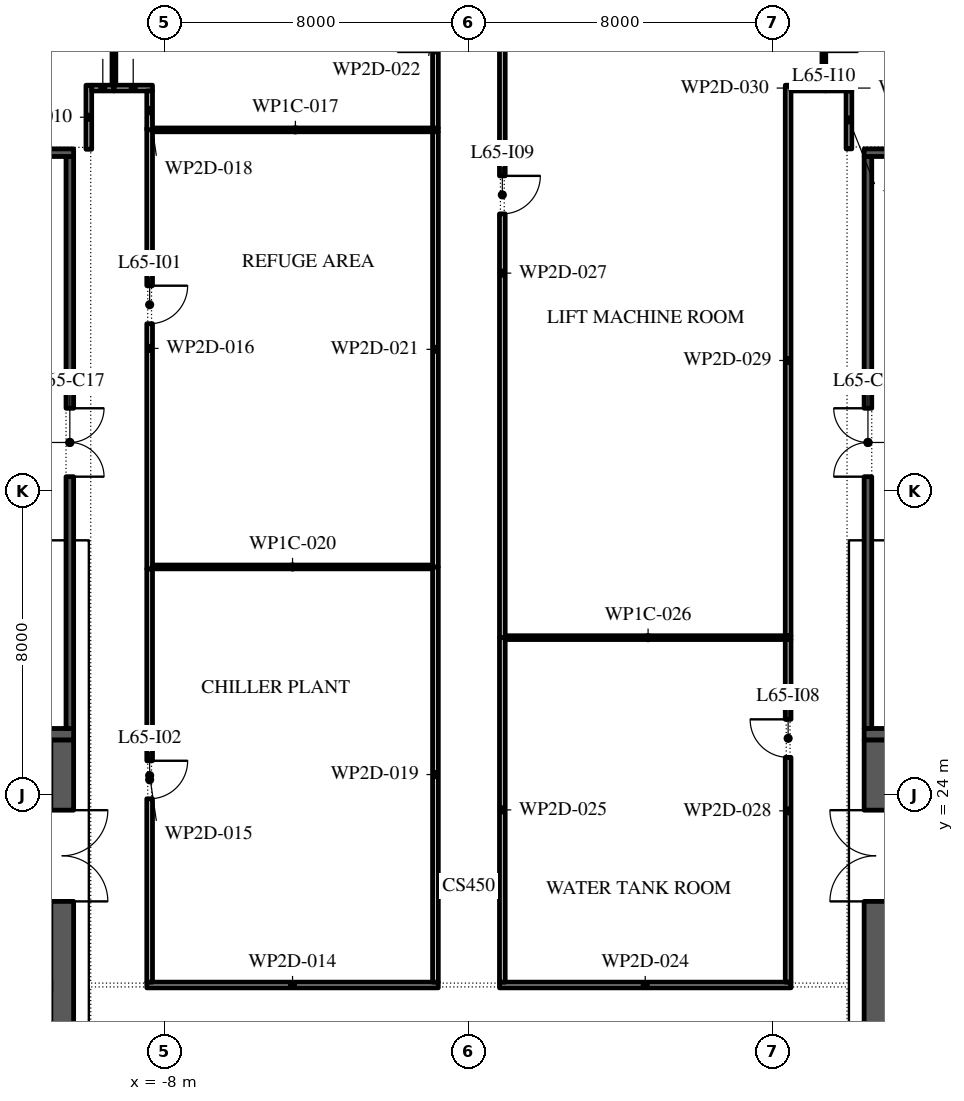
"""IFC4 building model, lengths in metres.
Left out: names, types, materials, properties, quantities, classifications, styles, units other than length and angle.
Written with IfcOpenShell. Run it as: python <this file> out.ifc"""

import sys

from ifc_helpers import new_model, si_unit, direction, frame, frame_2d, origin, place, context, subcontext, project, spatial, rectangle, extrude, element, fill, save


model = new_model("IFC4")
c1 = context("Model", 3, precision=1e-05, world=origin(), true_north=direction((0.0, 1.0)))
c2 = subcontext(c1, "Body", "Model", "MODEL_VIEW")
j1 = project(units=[si_unit("LENGTHUNIT", "METRE"), si_unit("PLANEANGLEUNIT", "RADIAN")], contexts=[c1])
p1 = place(None, origin())
s1 = spatial("IfcSite", under=j1, at=p1, CompositionType="ELEMENT")
p2 = place(p1, origin())
s2 = spatial("IfcBuilding", under=s1, at=p2, CompositionType="ELEMENT")
p3 = place(p2, frame((0.0, 0.0, 297.6)))
s3 = spatial("IfcBuildingStorey", under=s2, at=p3, CompositionType="ELEMENT", Elevation=297.6)
p4 = place(p3, frame((29.616, 40.758, 0.0), z_axis=(0.0, 0.0, 1.0), x_axis=(-0.974370532314, 0.224949029246, 0.0)))
e1 = element("IfcWall", 1, at=p4, inside=s3, PredefinedType="STANDARD", context=c2, shape_type="SweptSolid", body=[
    extrude(rectangle(XDim=48.0, YDim=0.3, at=frame_2d((24.0, 0.0))), origin(), (0.0, 0.0, 1.0), 4.95),
])
p5 = place(p4, frame((2.075, 0.0, 0.6)))
e2 = element("IfcOpeningElement", 2, at=p5, cuts=e1, PredefinedType="OPENING", context=c2, shape_type="SweptSolid", body=[
    extrude(rectangle(XDim=3.6, YDim=3.9, at=frame_2d((1.8, 1.95))), frame((0.0, 0.16, 0.0), z_axis=(0.0, -1.0, 0.0), x_axis=(1.0, 0.0, 0.0)), (0.0, 0.0, 1.0), 0.32),
])
p6 = place(p4, frame((9.975, 0.0, 0.6)))
e3 = element("IfcOpeningElement", 3, at=p6, cuts=e1, PredefinedType="OPENING", context=c2, shape_type="SweptSolid", body=[
    extrude(rectangle(XDim=3.6, YDim=3.55, at=frame_2d((1.8, 1.775))), frame((0.0, 0.16, 0.0), z_axis=(0.0, -1.0, 0.0), x_axis=(1.0, 0.0, 0.0)), (0.0, 0.0, 1.0), 0.32),
])
p7 = place(p4, frame((18.025, 0.0, 0.6)))
e4 = element("IfcOpeningElement", 4, at=p7, cuts=e1, PredefinedType="OPENING", context=c2, shape_type="SweptSolid", body=[
    extrude(rectangle(XDim=3.6, YDim=3.55, at=frame_2d((1.8, 1.775))), frame((0.0, 0.16, 0.0), z_axis=(0.0, -1.0, 0.0), x_axis=(1.0, 0.0, 0.0)), (0.0, 0.0, 1.0), 0.32),
])
p8 = place(p4, frame((26.075, 0.0, 0.6)))
e5 = element("IfcOpeningElement", 5, at=p8, cuts=e1, PredefinedType="OPENING", context=c2, shape_type="SweptSolid", body=[
    extrude(rectangle(XDim=3.6, YDim=3.9, at=frame_2d((1.8, 1.95))), frame((0.0, 0.16, 0.0), z_axis=(0.0, -1.0, 0.0), x_axis=(1.0, 0.0, 0.0)), (0.0, 0.0, 1.0), 0.32),
])
p9 = place(p4, frame((34.125, 0.0, 0.6)))
e6 = element("IfcOpeningElement", 6, at=p9, cuts=e1, PredefinedType="OPENING", context=c2, shape_type="SweptSolid", body=[
    extrude(rectangle(XDim=3.6, YDim=3.55, at=frame_2d((1.8, 1.775))), frame((0.0, 0.16, 0.0), z_axis=(0.0, -1.0, 0.0), x_axis=(1.0, 0.0, 0.0)), (0.0, 0.0, 1.0), 0.32),
])
p10 = place(p4, frame((42.175, 0.0, 0.6)))
e7 = element("IfcOpeningElement", 7, at=p10, cuts=e1, PredefinedType="OPENING", context=c2, shape_type="SweptSolid", body=[
    extrude(rectangle(XDim=3.6, YDim=3.9, at=frame_2d((1.8, 1.95))), frame((0.0, 0.16, 0.0), z_axis=(0.0, -1.0, 0.0), x_axis=(1.0, 0.0, 0.0)), (0.0, 0.0, 1.0), 0.32),
])
p11 = place(p3, frame((-10.7, -2.45, 0.0), z_axis=(0.0, 0.0, 1.0), x_axis=(0.0, 1.0, 0.0)))
e8 = element("IfcWall", 8, at=p11, inside=s3, PredefinedType="SHEAR", context=c2, shape_type="SweptSolid", body=[
    extrude(rectangle(XDim=27.9, YDim=0.6, at=frame_2d((13.95, 0.0))), origin(), (0.0, 0.0, 1.0), 4.95),
])
p12 = place(p11, frame((23.65, 0.0, 0.0)))
e9 = element("IfcOpeningElement", 9, at=p12, cuts=e8, PredefinedType="OPENING", context=c2, shape_type="SweptSolid", body=[
    extrude(rectangle(XDim=2.4, YDim=2.1, at=frame_2d((1.2, 1.05))), frame((0.0, 0.31, 0.0), z_axis=(0.0, -1.0, 0.0), x_axis=(1.0, 0.0, 0.0)), (0.0, 0.0, 1.0), 0.62),
])
p13 = place(p11, frame((0.938, 0.0, 0.0)))
e10 = element("IfcOpeningElement", 10, at=p13, cuts=e8, PredefinedType="OPENING", context=c2, shape_type="SweptSolid", body=[
    extrude(rectangle(XDim=1.8, YDim=2.4, at=frame_2d((0.9, 1.2))), frame((0.0, 0.31, 0.0), z_axis=(0.0, -1.0, 0.0), x_axis=(1.0, 0.0, 0.0)), (0.0, 0.0, 1.0), 0.62),
])
p14 = place(p11, frame((4.163, 0.0, 0.0)))
e11 = element("IfcOpeningElement", 11, at=p14, cuts=e8, PredefinedType="OPENING", context=c2, shape_type="SweptSolid", body=[
    extrude(rectangle(XDim=1.8, YDim=2.4, at=frame_2d((0.9, 1.2))), frame((0.0, 0.31, 0.0), z_axis=(0.0, -1.0, 0.0), x_axis=(1.0, 0.0, 0.0)), (0.0, 0.0, 1.0), 0.62),
])
p15 = place(p3, frame((-21.6, 25.6, 0.0), z_axis=(0.0, 0.0, 1.0), x_axis=(1.0, 0.0, 0.0)))
e12 = element("IfcWall", 12, at=p15, inside=s3, PredefinedType="SHEAR", context=c2, shape_type="SweptSolid", body=[
    extrude(rectangle(XDim=11.2, YDim=0.3, at=frame_2d((5.6, 0.0))), origin(), (0.0, 0.0, 1.0), 4.95),
])
p16 = place(p3, frame((-10.5, 25.75, 0.0), z_axis=(0.0, 0.0, 1.0), x_axis=(0.0, 1.0, 0.0)))
e13 = element("IfcWall", 13, at=p16, inside=s3, PredefinedType="SHEAR", context=c2, shape_type="SweptSolid", body=[
    extrude(rectangle(XDim=15.05, YDim=0.2, at=frame_2d((7.525, 0.0))), origin(), (0.0, 0.0, 1.0), 4.95),
])
p17 = place(p16, frame((6.625, 0.0, 0.0)))
e14 = element("IfcOpeningElement", 14, at=p17, cuts=e13, PredefinedType="OPENING", context=c2, shape_type="SweptSolid", body=[
    extrude(rectangle(XDim=1.8, YDim=2.4, at=frame_2d((0.9, 1.2))), frame((0.0, 0.11, 0.0), z_axis=(0.0, -1.0, 0.0), x_axis=(1.0, 0.0, 0.0)), (0.0, 0.0, 1.0), 0.22),
])
p18 = place(p3, frame((-21.6, 40.9, 0.0), z_axis=(0.0, 0.0, 1.0), x_axis=(1.0, 0.0, 0.0)))
e15 = element("IfcWall", 15, at=p18, inside=s3, PredefinedType="SHEAR", context=c2, shape_type="SweptSolid", body=[
    extrude(rectangle(XDim=11.2, YDim=0.2, at=frame_2d((5.6, 0.0))), origin(), (0.0, 0.0, 1.0), 4.95),
])
p19 = place(p3, frame((10.7, -2.45, 0.0), z_axis=(0.0, 0.0, 1.0), x_axis=(0.0, 1.0, 0.0)))
e16 = element("IfcWall", 16, at=p19, inside=s3, PredefinedType="SHEAR", context=c2, shape_type="SweptSolid", body=[
    extrude(rectangle(XDim=27.9, YDim=0.6, at=frame_2d((13.95, 0.0))), origin(), (0.0, 0.0, 1.0), 4.95),
])
p20 = place(p19, frame((23.65, 0.0, 0.0)))
e17 = element("IfcOpeningElement", 17, at=p20, cuts=e16, PredefinedType="OPENING", context=c2, shape_type="SweptSolid", body=[
    extrude(rectangle(XDim=2.4, YDim=2.1, at=frame_2d((1.2, 1.05))), frame((0.0, 0.31, 0.0), z_axis=(0.0, -1.0, 0.0), x_axis=(1.0, 0.0, 0.0)), (0.0, 0.0, 1.0), 0.62),
])
p21 = place(p19, frame((0.337, 0.0, 0.0)))
e18 = element("IfcOpeningElement", 18, at=p21, cuts=e16, PredefinedType="OPENING", context=c2, shape_type="SweptSolid", body=[
    extrude(rectangle(XDim=1.8, YDim=2.4, at=frame_2d((0.9, 1.2))), frame((0.0, 0.31, 0.0), z_axis=(0.0, -1.0, 0.0), x_axis=(1.0, 0.0, 0.0)), (0.0, 0.0, 1.0), 0.62),
])
p22 = place(p19, frame((3.562, 0.0, 0.0)))
e19 = element("IfcOpeningElement", 19, at=p22, cuts=e16, PredefinedType="OPENING", context=c2, shape_type="SweptSolid", body=[
    extrude(rectangle(XDim=1.8, YDim=2.4, at=frame_2d((0.9, 1.2))), frame((0.0, 0.31, 0.0), z_axis=(0.0, -1.0, 0.0), x_axis=(1.0, 0.0, 0.0)), (0.0, 0.0, 1.0), 0.62),
])
p23 = place(p3, frame((10.4, 25.6, 0.0), z_axis=(0.0, 0.0, 1.0), x_axis=(1.0, 0.0, 0.0)))
e20 = element("IfcWall", 20, at=p23, inside=s3, PredefinedType="SHEAR", context=c2, shape_type="SweptSolid", body=[
    extrude(rectangle(XDim=11.2, YDim=0.3, at=frame_2d((5.6, 0.0))), origin(), (0.0, 0.0, 1.0), 4.95),
])
p24 = place(p3, frame((10.5, 25.75, 0.0), z_axis=(0.0, 0.0, 1.0), x_axis=(0.0, 1.0, 0.0)))
e21 = element("IfcWall", 21, at=p24, inside=s3, PredefinedType="SHEAR", context=c2, shape_type="SweptSolid", body=[
    extrude(rectangle(XDim=15.05, YDim=0.2, at=frame_2d((7.525, 0.0))), origin(), (0.0, 0.0, 1.0), 4.95),
])
p25 = place(p24, frame((6.625, 0.0, 0.0)))
e22 = element("IfcOpeningElement", 22, at=p25, cuts=e21, PredefinedType="OPENING", context=c2, shape_type="SweptSolid", body=[
    extrude(rectangle(XDim=1.8, YDim=2.4, at=frame_2d((0.9, 1.2))), frame((0.0, 0.11, 0.0), z_axis=(0.0, -1.0, 0.0), x_axis=(1.0, 0.0, 0.0)), (0.0, 0.0, 1.0), 0.22),
])
p26 = place(p3, frame((10.4, 40.9, 0.0), z_axis=(0.0, 0.0, 1.0), x_axis=(1.0, 0.0, 0.0)))
e23 = element("IfcWall", 23, at=p26, inside=s3, PredefinedType="SHEAR", context=c2, shape_type="SweptSolid", body=[
    extrude(rectangle(XDim=11.2, YDim=0.2, at=frame_2d((5.6, 0.0))), origin(), (0.0, 0.0, 1.0), 4.95),
])
p27 = place(p3, frame((-10.0, 40.99, 0.0), z_axis=(0.0, 0.0, 1.0), x_axis=(0.0, 1.0, 0.0)))
e24 = element("IfcWall", 24, at=p27, inside=s3, PredefinedType="PARTITIONING", context=c2, shape_type="SweptSolid", body=[
    extrude(rectangle(XDim=1.685, YDim=0.15, at=frame_2d((0.843, 0.0))), origin(), (0.0, 0.0, 1.0), 4.95),
])
p28 = place(p3, frame((-9.925, 42.6, 0.0), z_axis=(0.0, 0.0, 1.0), x_axis=(1.0, 0.0, 0.0)))
e25 = element("IfcWall", 25, at=p28, inside=s3, PredefinedType="PARTITIONING", context=c2, shape_type="SweptSolid", body=[
    extrude(rectangle(XDim=0.585, YDim=0.15, at=frame_2d((0.292, 0.0))), origin(), (0.0, 0.0, 1.0), 4.95),
])
p29 = place(p3, frame((-9.34, 42.675, 0.0), z_axis=(0.0, 0.0, 1.0), x_axis=(0.0, 1.0, 0.0)))
e26 = element("IfcWall", 26, at=p29, inside=s3, PredefinedType="PARTITIONING", context=c2, shape_type="SweptSolid", body=[
    extrude(rectangle(XDim=7.006, YDim=0.1, at=frame_2d((3.503, 0.0))), origin(), (0.0, 0.0, 1.0), 4.95),
])
p30 = place(p29, frame((2.375, 0.0, 0.0)))
e27 = element("IfcOpeningElement", 27, at=p30, cuts=e26, PredefinedType="OPENING", context=c2, shape_type="SweptSolid", body=[
    extrude(rectangle(XDim=0.9, YDim=2.1, at=frame_2d((0.45, 1.05))), frame((0.0, 0.06, 0.0), z_axis=(0.0, -1.0, 0.0), x_axis=(1.0, 0.0, 0.0)), (0.0, 0.0, 1.0), 0.12),
])
p31 = place(p3, frame((-9.34, 42.6, 0.0), z_axis=(0.0, 0.0, 1.0), x_axis=(1.0, 0.0, 0.0)))
e28 = element("IfcWall", 28, at=p31, inside=s3, PredefinedType="PARTITIONING", context=c2, shape_type="SweptSolid", body=[
    extrude(rectangle(XDim=1.015, YDim=0.15, at=frame_2d((0.508, 0.0))), origin(), (0.0, 0.0, 1.0), 4.95),
])
p32 = place(p3, frame((-8.475, 19.0, 0.0), z_axis=(0.0, 0.0, 1.0), x_axis=(1.0, 0.0, 0.0)))
e29 = element("IfcWall", 29, at=p32, inside=s3, PredefinedType="PARTITIONING", context=c2, shape_type="SweptSolid", body=[
    extrude(rectangle(XDim=7.67, YDim=0.15, at=frame_2d((3.835, 0.0))), origin(), (0.0, 0.0, 1.0), 4.95),
])
p33 = place(p3, frame((-8.4, 29.95, 0.0), z_axis=(0.0, 0.0, 1.0), x_axis=(0.0, -1.0, 0.0)))
e30 = element("IfcWall", 30, at=p33, inside=s3, PredefinedType="PARTITIONING", context=c2, shape_type="SweptSolid", body=[
    extrude(rectangle(XDim=10.875, YDim=0.15, at=frame_2d((5.438, 0.0))), origin(), (0.0, 0.0, 1.0), 4.95),
])
p34 = place(p33, frame((5.05, 0.0, 0.0)))
e31 = element("IfcOpeningElement", 31, at=p34, cuts=e30, PredefinedType="OPENING", context=c2, shape_type="SweptSolid", body=[
    extrude(rectangle(XDim=1.0, YDim=2.1, at=frame_2d((0.5, 1.05))), frame((0.0, 0.085, 0.0), z_axis=(0.0, -1.0, 0.0), x_axis=(1.0, 0.0, 0.0)), (0.0, 0.0, 1.0), 0.17),
])
p35 = place(p3, frame((-8.4, 41.55, 0.0), z_axis=(0.0, 0.0, 1.0), x_axis=(0.0, -1.0, 0.0)))
e32 = element("IfcWall", 32, at=p35, inside=s3, PredefinedType="PARTITIONING", context=c2, shape_type="SweptSolid", body=[
    extrude(rectangle(XDim=11.6, YDim=0.15, at=frame_2d((5.8, 0.0))), origin(), (0.0, 0.0, 1.0), 4.95),
])
p36 = place(p35, frame((4.15, 0.0, 0.0)))
e33 = element("IfcOpeningElement", 33, at=p36, cuts=e32, PredefinedType="OPENING", context=c2, shape_type="SweptSolid", body=[
    extrude(rectangle(XDim=1.0, YDim=2.1, at=frame_2d((0.5, 1.05))), frame((0.0, 0.085, 0.0), z_axis=(0.0, -1.0, 0.0), x_axis=(1.0, 0.0, 0.0)), (0.0, 0.0, 1.0), 0.17),
])
p37 = place(p3, frame((-8.325, 41.5, 0.0), z_axis=(0.0, 0.0, 1.0), x_axis=(1.0, 0.0, 0.0)))
e34 = element("IfcWall", 34, at=p37, inside=s3, PredefinedType="PARTITIONING", context=c2, shape_type="SweptSolid", body=[
    extrude(rectangle(XDim=7.52, YDim=0.1, at=frame_2d((3.76, 0.0))), origin(), (0.0, 0.0, 1.0), 4.95),
])
p38 = place(p3, frame((-8.4, 42.525, 0.0), z_axis=(0.0, 0.0, 1.0), x_axis=(0.0, -1.0, 0.0)))
e35 = element("IfcWall", 35, at=p38, inside=s3, PredefinedType="PARTITIONING", context=c2, shape_type="SweptSolid", body=[
    extrude(rectangle(XDim=1.025, YDim=0.15, at=frame_2d((0.512, 0.0))), origin(), (0.0, 0.0, 1.0), 4.95),
])
p39 = place(p3, frame((-0.88, 19.075, 0.0), z_axis=(0.0, 0.0, 1.0), x_axis=(0.0, 1.0, 0.0)))
e36 = element("IfcWall", 36, at=p39, inside=s3, PredefinedType="PARTITIONING", context=c2, shape_type="SweptSolid", body=[
    extrude(rectangle(XDim=10.925, YDim=0.15, at=frame_2d((5.462, 0.0))), origin(), (0.0, 0.0, 1.0), 4.95),
])
p40 = place(p3, frame((-0.955, 30.0, 0.0), z_axis=(0.0, 0.0, 1.0), x_axis=(-1.0, 0.0, 0.0)))
e37 = element("IfcWall", 37, at=p40, inside=s3, PredefinedType="PARTITIONING", context=c2, shape_type="SweptSolid", body=[
    extrude(rectangle(XDim=7.37, YDim=0.1, at=frame_2d((3.685, 0.0))), origin(), (0.0, 0.0, 1.0), 4.95),
])
p41 = place(p3, frame((-0.88, 30.0, 0.0), z_axis=(0.0, 0.0, 1.0), x_axis=(0.0, 1.0, 0.0)))
e38 = element("IfcWall", 38, at=p41, inside=s3, PredefinedType="PARTITIONING", context=c2, shape_type="SweptSolid", body=[
    extrude(rectangle(XDim=11.45, YDim=0.15, at=frame_2d((5.725, 0.0))), origin(), (0.0, 0.0, 1.0), 4.95),
])
p42 = place(p3, frame((-0.88, 41.55, 0.0), z_axis=(0.0, 0.0, 1.0), x_axis=(0.0, 1.0, 0.0)))
e39 = element("IfcWall", 39, at=p42, inside=s3, PredefinedType="PARTITIONING", context=c2, shape_type="SweptSolid", body=[
    extrude(rectangle(XDim=6.178, YDim=0.15, at=frame_2d((3.089, 0.0))), origin(), (0.0, 0.0, 1.0), 4.95),
])
p43 = place(p42, frame((2.0, 0.0, 0.0)))
e40 = element("IfcOpeningElement", 40, at=p43, cuts=e39, PredefinedType="OPENING", context=c2, shape_type="SweptSolid", body=[
    extrude(rectangle(XDim=1.0, YDim=2.1, at=frame_2d((0.5, 1.05))), frame((0.0, 0.085, 0.0), z_axis=(0.0, -1.0, 0.0), x_axis=(1.0, 0.0, 0.0)), (0.0, 0.0, 1.0), 0.17),
])
p44 = place(p3, frame((0.805, 19.0, 0.0), z_axis=(0.0, 0.0, 1.0), x_axis=(1.0, 0.0, 0.0)))
e41 = element("IfcWall", 41, at=p44, inside=s3, PredefinedType="PARTITIONING", context=c2, shape_type="SweptSolid", body=[
    extrude(rectangle(XDim=7.67, YDim=0.15, at=frame_2d((3.835, 0.0))), origin(), (0.0, 0.0, 1.0), 4.95),
])
p45 = place(p3, frame((0.88, 28.14, 0.0), z_axis=(0.0, 0.0, 1.0), x_axis=(0.0, -1.0, 0.0)))
e42 = element("IfcWall", 42, at=p45, inside=s3, PredefinedType="PARTITIONING", context=c2, shape_type="SweptSolid", body=[
    extrude(rectangle(XDim=9.065, YDim=0.15, at=frame_2d((4.532, 0.0))), origin(), (0.0, 0.0, 1.0), 4.95),
])
p46 = place(p3, frame((0.955, 28.14, 0.0), z_axis=(0.0, 0.0, 1.0), x_axis=(1.0, 0.0, 0.0)))
e43 = element("IfcWall", 43, at=p46, inside=s3, PredefinedType="PARTITIONING", context=c2, shape_type="SweptSolid", body=[
    extrude(rectangle(XDim=7.52, YDim=0.1, at=frame_2d((3.76, 0.0))), origin(), (0.0, 0.0, 1.0), 4.95),
])
p47 = place(p3, frame((0.88, 47.321, 0.0), z_axis=(0.0, 0.0, 1.0), x_axis=(0.0, -1.0, 0.0)))
e44 = element("IfcWall", 44, at=p47, inside=s3, PredefinedType="PARTITIONING", context=c2, shape_type="SweptSolid", body=[
    extrude(rectangle(XDim=19.181, YDim=0.15, at=frame_2d((9.591, 0.0))), origin(), (0.0, 0.0, 1.0), 4.95),
])
p48 = place(p47, frame((7.031, 0.0, 0.0)))
e45 = element("IfcOpeningElement", 45, at=p48, cuts=e44, PredefinedType="OPENING", context=c2, shape_type="SweptSolid", body=[
    extrude(rectangle(XDim=1.0, YDim=2.1, at=frame_2d((0.5, 1.05))), frame((0.0, 0.085, 0.0), z_axis=(0.0, -1.0, 0.0), x_axis=(1.0, 0.0, 0.0)), (0.0, 0.0, 1.0), 0.17),
])
p49 = place(p3, frame((8.4, 19.075, 0.0), z_axis=(0.0, 0.0, 1.0), x_axis=(0.0, 1.0, 0.0)))
e46 = element("IfcWall", 46, at=p49, inside=s3, PredefinedType="PARTITIONING", context=c2, shape_type="SweptSolid", body=[
    extrude(rectangle(XDim=9.015, YDim=0.15, at=frame_2d((4.508, 0.0))), origin(), (0.0, 0.0, 1.0), 4.95),
])
p50 = place(p49, frame((5.915, 0.0, 0.0)))
e47 = element("IfcOpeningElement", 47, at=p50, cuts=e46, PredefinedType="OPENING", context=c2, shape_type="SweptSolid", body=[
    extrude(rectangle(XDim=1.0, YDim=2.1, at=frame_2d((0.5, 1.05))), frame((0.0, 0.085, 0.0), z_axis=(0.0, -1.0, 0.0), x_axis=(1.0, 0.0, 0.0)), (0.0, 0.0, 1.0), 0.17),
])
p51 = place(p3, frame((8.4, 28.19, 0.0), z_axis=(0.0, 0.0, 1.0), x_axis=(0.0, 1.0, 0.0)))
e48 = element("IfcWall", 48, at=p51, inside=s3, PredefinedType="PARTITIONING", context=c2, shape_type="SweptSolid", body=[
    extrude(rectangle(XDim=14.485, YDim=0.15, at=frame_2d((7.243, 0.0))), origin(), (0.0, 0.0, 1.0), 4.95),
])
p52 = place(p3, frame((8.475, 42.6, 0.0), z_axis=(0.0, 0.0, 1.0), x_axis=(1.0, 0.0, 0.0)))
e49 = element("IfcWall", 49, at=p52, inside=s3, PredefinedType="PARTITIONING", context=c2, shape_type="SweptSolid", body=[
    extrude(rectangle(XDim=0.915, YDim=0.15, at=frame_2d((0.458, 0.0))), origin(), (0.0, 0.0, 1.0), 4.95),
])
p53 = place(p3, frame((9.39, 42.6, 0.0), z_axis=(0.0, 0.0, 1.0), x_axis=(1.0, 0.0, 0.0)))
e50 = element("IfcWall", 50, at=p53, inside=s3, PredefinedType="PARTITIONING", context=c2, shape_type="SweptSolid", body=[
    extrude(rectangle(XDim=0.685, YDim=0.15, at=frame_2d((0.343, 0.0))), origin(), (0.0, 0.0, 1.0), 4.95),
])
p54 = place(p3, frame((9.34, 45.368, 0.0), z_axis=(0.0, 0.0, 1.0), x_axis=(0.0, -1.0, 0.0)))
e51 = element("IfcWall", 51, at=p54, inside=s3, PredefinedType="PARTITIONING", context=c2, shape_type="SweptSolid", body=[
    extrude(rectangle(XDim=2.693, YDim=0.1, at=frame_2d((1.346, 0.0))), origin(), (0.0, 0.0, 1.0), 4.95),
])
p55 = place(p54, frame((0.918, 0.0, 0.0)))
e52 = element("IfcOpeningElement", 52, at=p55, cuts=e51, PredefinedType="OPENING", context=c2, shape_type="SweptSolid", body=[
    extrude(rectangle(XDim=0.9, YDim=2.1, at=frame_2d((0.45, 1.05))), frame((0.0, 0.06, 0.0), z_axis=(0.0, -1.0, 0.0), x_axis=(1.0, 0.0, 0.0)), (0.0, 0.0, 1.0), 0.12),
])
p56 = place(p3, frame((10.0, 42.525, 0.0), z_axis=(0.0, 0.0, 1.0), x_axis=(0.0, -1.0, 0.0)))
e53 = element("IfcWall", 53, at=p56, inside=s3, PredefinedType="PARTITIONING", context=c2, shape_type="SweptSolid", body=[
    extrude(rectangle(XDim=1.525, YDim=0.15, at=frame_2d((0.762, 0.0))), origin(), (0.0, 0.0, 1.0), 4.95),
])
p57 = place(p12, frame((2.4, 0.0, 0.0), z_axis=(0.0, 0.0, 1.0), x_axis=(-1.0, 0.0, 0.0)))
e54 = element("IfcDoor", 54, at=p57, inside=s3, OperationType="DOUBLE_DOOR_SINGLE_SWING", PredefinedType="DOOR", context=c2, shape_type="SweptSolid", body=[
    extrude(rectangle(XDim=2.4, YDim=2.1, at=frame_2d((1.2, 1.05))), frame((0.0, 0.025, 0.0), z_axis=(0.0, -1.0, 0.0), x_axis=(1.0, 0.0, 0.0)), (0.0, 0.0, 1.0), 0.05),
])
fill(e9, e54)
p58 = place(p17, frame((1.8, 0.15, 0.0), z_axis=(0.0, 0.0, 1.0), x_axis=(-1.0, 0.0, 0.0)))
e55 = element("IfcDoor", 55, at=p58, inside=s3, OperationType="DOUBLE_DOOR_SINGLE_SWING", PredefinedType="DOOR", context=c2, shape_type="SweptSolid", body=[
    extrude(rectangle(XDim=1.8, YDim=2.4, at=frame_2d((0.9, 1.2))), frame((0.0, 0.1, 0.0), z_axis=(0.0, -1.0, 0.0), x_axis=(1.0, 0.0, 0.0)), (0.0, 0.0, 1.0), 0.05),
])
fill(e14, e55)
p59 = place(p20, origin())
e56 = element("IfcDoor", 56, at=p59, inside=s3, OperationType="DOUBLE_DOOR_SINGLE_SWING", PredefinedType="DOOR", context=c2, shape_type="SweptSolid", body=[
    extrude(rectangle(XDim=2.4, YDim=2.1, at=frame_2d((1.2, 1.05))), frame((0.0, 0.025, 0.0), z_axis=(0.0, -1.0, 0.0), x_axis=(1.0, 0.0, 0.0)), (0.0, 0.0, 1.0), 0.05),
])
fill(e17, e56)
p60 = place(p25, origin())
e57 = element("IfcDoor", 57, at=p60, inside=s3, OperationType="DOUBLE_DOOR_SINGLE_SWING", PredefinedType="DOOR", context=c2, shape_type="SweptSolid", body=[
    extrude(rectangle(XDim=1.8, YDim=2.4, at=frame_2d((0.9, 1.2))), frame((0.0, -0.05, 0.0), z_axis=(0.0, -1.0, 0.0), x_axis=(1.0, 0.0, 0.0)), (0.0, 0.0, 1.0), 0.05),
])
fill(e22, e57)
p61 = place(p36, origin())
e58 = element("IfcDoor", 58, at=p61, inside=s3, OperationType="SINGLE_SWING_RIGHT", PredefinedType="DOOR", context=c2, shape_type="SweptSolid", body=[
    extrude(rectangle(XDim=1.0, YDim=2.1, at=frame_2d((0.5, 1.05))), frame((0.0, 0.025, 0.0), z_axis=(0.0, -1.0, 0.0), x_axis=(1.0, 0.0, 0.0)), (0.0, 0.0, 1.0), 0.05),
])
fill(e33, e58)
p62 = place(p34, origin())
e59 = element("IfcDoor", 59, at=p62, inside=s3, OperationType="SINGLE_SWING_RIGHT", PredefinedType="DOOR", context=c2, shape_type="SweptSolid", body=[
    extrude(rectangle(XDim=1.0, YDim=2.1, at=frame_2d((0.5, 1.05))), frame((0.0, 0.025, 0.0), z_axis=(0.0, -1.0, 0.0), x_axis=(1.0, 0.0, 0.0)), (0.0, 0.0, 1.0), 0.05),
])
fill(e31, e59)
p63 = place(p50, origin())
e60 = element("IfcDoor", 60, at=p63, inside=s3, OperationType="SINGLE_SWING_LEFT", PredefinedType="DOOR", context=c2, shape_type="SweptSolid", body=[
    extrude(rectangle(XDim=1.0, YDim=2.1, at=frame_2d((0.5, 1.05))), frame((0.0, 0.025, 0.0), z_axis=(0.0, -1.0, 0.0), x_axis=(1.0, 0.0, 0.0)), (0.0, 0.0, 1.0), 0.05),
])
fill(e47, e60)
p64 = place(p48, origin())
e61 = element("IfcDoor", 61, at=p64, inside=s3, OperationType="SINGLE_SWING_RIGHT", PredefinedType="DOOR", context=c2, shape_type="SweptSolid", body=[
    extrude(rectangle(XDim=1.0, YDim=2.1, at=frame_2d((0.5, 1.05))), frame((0.0, 0.025, 0.0), z_axis=(0.0, -1.0, 0.0), x_axis=(1.0, 0.0, 0.0)), (0.0, 0.0, 1.0), 0.05),
])
fill(e45, e61)
save(model, sys.argv[1])
